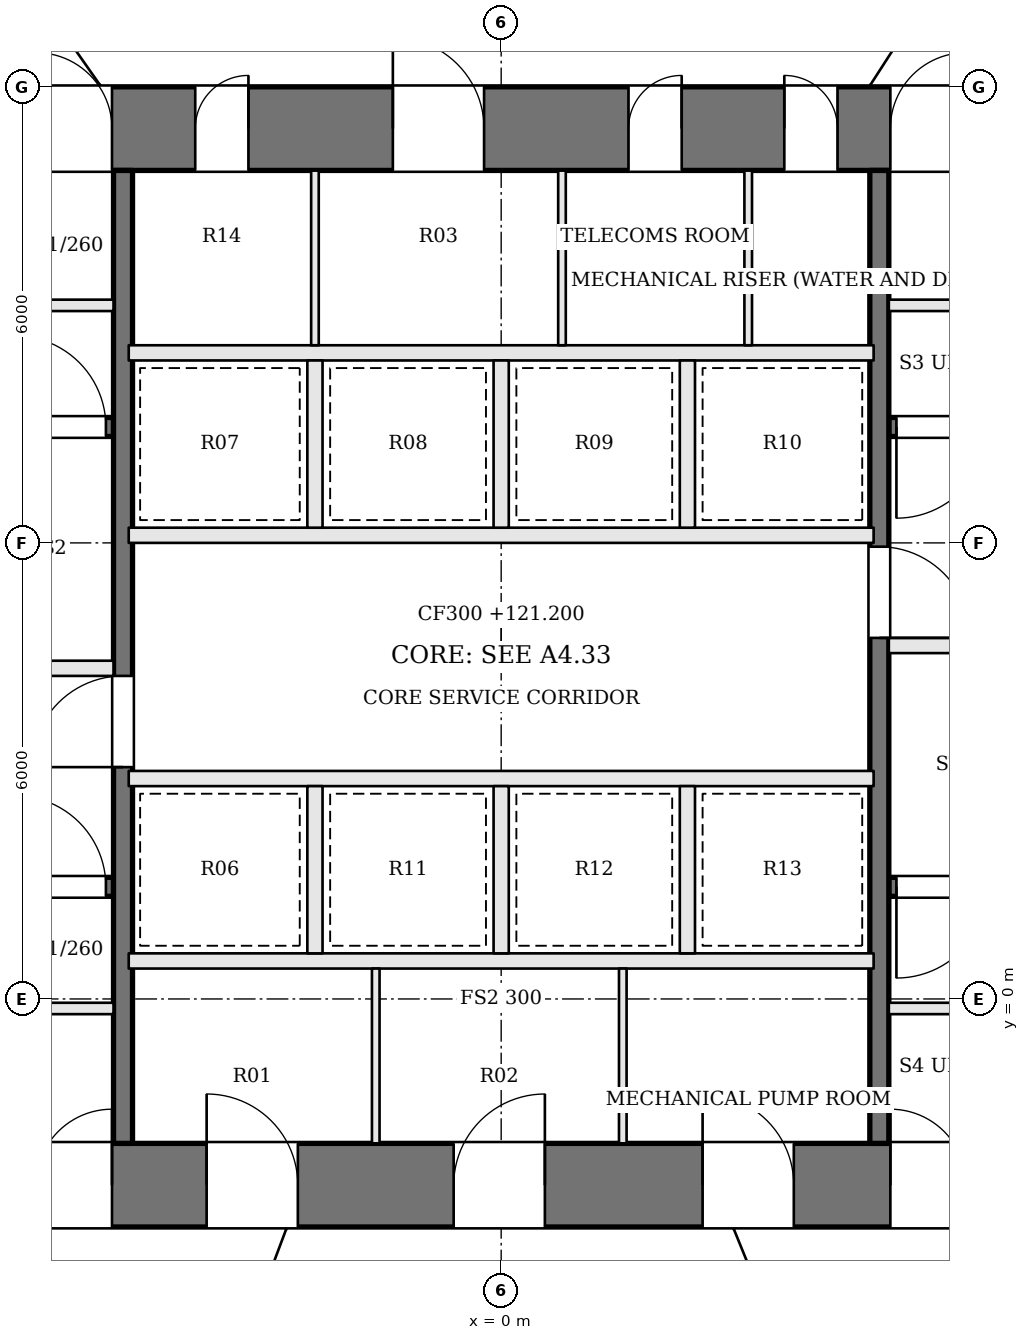
"""IFC4 building model, lengths in metres.
Left out: names, types, materials, properties, quantities, classifications, styles, units other than length and angle.
Written with IfcOpenShell. Run it as: python <this file> out.ifc"""

import sys

from ifc_helpers import new_model, si_unit, direction, frame, frame_2d, origin, place, context, subcontext, project, spatial, rectangle, extrude, element, fill, save


model = new_model("IFC4")
c1 = context("Model", 3, precision=1e-05, world=origin(), true_north=direction((0.0, 1.0)))
c2 = subcontext(c1, "Body", "Model", "MODEL_VIEW")
j1 = project(units=[si_unit("LENGTHUNIT", "METRE"), si_unit("PLANEANGLEUNIT", "RADIAN")], contexts=[c1])
p1 = place(None, origin())
s1 = spatial("IfcSite", under=j1, at=p1, CompositionType="ELEMENT")
p2 = place(p1, origin())
s2 = spatial("IfcBuilding", under=s1, at=p2, CompositionType="ELEMENT")
p3 = place(p2, frame((0.0, 0.0, 121.2)))
s3 = spatial("IfcBuildingStorey", under=s2, at=p3, CompositionType="ELEMENT", Elevation=121.2)
p4 = place(p3, frame((-13.0, 11.45, 0.0), z_axis=(0.0, 0.0, 1.0), x_axis=(1.0, 0.0, 0.0)))
e1 = element("IfcWall", 1, at=p4, inside=s3, PredefinedType="SHEAR", context=c2, shape_type="SweptSolid", body=[
    extrude(rectangle(XDim=26.0, YDim=1.1, at=frame_2d((13.0, 0.0))), origin(), (0.0, 0.0, 1.0), 4.5),
])
p5 = place(p4, frame((8.975, 0.0, 0.0)))
e2 = element("IfcOpeningElement", 2, at=p5, cuts=e1, PredefinedType="OPENING", context=c2, shape_type="SweptSolid", body=[
    extrude(rectangle(XDim=0.7, YDim=2.1, at=frame_2d((0.35, 1.05))), frame((0.0, 0.56, 0.0), z_axis=(0.0, -1.0, 0.0), x_axis=(1.0, 0.0, 0.0)), (0.0, 0.0, 1.0), 1.12),
])
p6 = place(p4, frame((11.575, 0.0, 0.0)))
e3 = element("IfcOpeningElement", 3, at=p6, cuts=e1, PredefinedType="OPENING", context=c2, shape_type="SweptSolid", body=[
    extrude(rectangle(XDim=1.2, YDim=2.1, at=frame_2d((0.6, 1.05))), frame((0.0, 0.56, 0.0), z_axis=(0.0, -1.0, 0.0), x_axis=(1.0, 0.0, 0.0)), (0.0, 0.0, 1.0), 1.12),
])
p7 = place(p4, frame((14.675, 0.0, 0.0)))
e4 = element("IfcOpeningElement", 4, at=p7, cuts=e1, PredefinedType="OPENING", context=c2, shape_type="SweptSolid", body=[
    extrude(rectangle(XDim=0.7, YDim=2.1, at=frame_2d((0.35, 1.05))), frame((0.0, 0.56, 0.0), z_axis=(0.0, -1.0, 0.0), x_axis=(1.0, 0.0, 0.0)), (0.0, 0.0, 1.0), 1.12),
])
p8 = place(p4, frame((16.725, 0.0, 0.0)))
e5 = element("IfcOpeningElement", 5, at=p8, cuts=e1, PredefinedType="OPENING", context=c2, shape_type="SweptSolid", body=[
    extrude(rectangle(XDim=0.7, YDim=2.1, at=frame_2d((0.35, 1.05))), frame((0.0, 0.56, 0.0), z_axis=(0.0, -1.0, 0.0), x_axis=(1.0, 0.0, 0.0)), (0.0, 0.0, 1.0), 1.12),
])
p9 = place(p4, frame((6.88, 0.0, 0.0)))
e6 = element("IfcOpeningElement", 6, at=p9, cuts=e1, PredefinedType="OPENING", context=c2, shape_type="SweptSolid", body=[
    extrude(rectangle(XDim=1.0, YDim=2.1, at=frame_2d((0.5, 1.05))), frame((0.0, 0.56, 0.0), z_axis=(0.0, -1.0, 0.0), x_axis=(1.0, 0.0, 0.0)), (0.0, 0.0, 1.0), 1.12),
])
p10 = place(p4, frame((18.12, 0.0, 0.0)))
e7 = element("IfcOpeningElement", 7, at=p10, cuts=e1, PredefinedType="OPENING", context=c2, shape_type="SweptSolid", body=[
    extrude(rectangle(XDim=1.0, YDim=2.1, at=frame_2d((0.5, 1.05))), frame((0.0, 0.56, 0.0), z_axis=(0.0, -1.0, 0.0), x_axis=(1.0, 0.0, 0.0)), (0.0, 0.0, 1.0), 1.12),
])
p11 = place(p3, frame((-13.0, -2.45, 0.0), z_axis=(0.0, 0.0, 1.0), x_axis=(1.0, 0.0, 0.0)))
e8 = element("IfcWall", 8, at=p11, inside=s3, PredefinedType="SHEAR", context=c2, shape_type="SweptSolid", body=[
    extrude(rectangle(XDim=26.0, YDim=1.1, at=frame_2d((13.0, 0.0))), origin(), (0.0, 0.0, 1.0), 4.5),
])
p12 = place(p11, frame((9.125, 0.0, 0.0)))
e9 = element("IfcOpeningElement", 9, at=p12, cuts=e8, PredefinedType="OPENING", context=c2, shape_type="SweptSolid", body=[
    extrude(rectangle(XDim=1.2, YDim=2.1, at=frame_2d((0.6, 1.05))), frame((0.0, 0.56, 0.0), z_axis=(0.0, -1.0, 0.0), x_axis=(1.0, 0.0, 0.0)), (0.0, 0.0, 1.0), 1.12),
])
p13 = place(p11, frame((12.375, 0.0, 0.0)))
e10 = element("IfcOpeningElement", 10, at=p13, cuts=e8, PredefinedType="OPENING", context=c2, shape_type="SweptSolid", body=[
    extrude(rectangle(XDim=1.2, YDim=2.1, at=frame_2d((0.6, 1.05))), frame((0.0, 0.56, 0.0), z_axis=(0.0, -1.0, 0.0), x_axis=(1.0, 0.0, 0.0)), (0.0, 0.0, 1.0), 1.12),
])
p14 = place(p11, frame((15.65, 0.0, 0.0)))
e11 = element("IfcOpeningElement", 11, at=p14, cuts=e8, PredefinedType="OPENING", context=c2, shape_type="SweptSolid", body=[
    extrude(rectangle(XDim=1.2, YDim=2.1, at=frame_2d((0.6, 1.05))), frame((0.0, 0.56, 0.0), z_axis=(0.0, -1.0, 0.0), x_axis=(1.0, 0.0, 0.0)), (0.0, 0.0, 1.0), 1.12),
])
p15 = place(p11, frame((6.88, 0.0, 0.0)))
e12 = element("IfcOpeningElement", 12, at=p15, cuts=e8, PredefinedType="OPENING", context=c2, shape_type="SweptSolid", body=[
    extrude(rectangle(XDim=1.0, YDim=2.1, at=frame_2d((0.5, 1.05))), frame((0.0, 0.56, 0.0), z_axis=(0.0, -1.0, 0.0), x_axis=(1.0, 0.0, 0.0)), (0.0, 0.0, 1.0), 1.12),
])
p16 = place(p11, frame((18.12, 0.0, 0.0)))
e13 = element("IfcOpeningElement", 13, at=p16, cuts=e8, PredefinedType="OPENING", context=c2, shape_type="SweptSolid", body=[
    extrude(rectangle(XDim=1.0, YDim=2.1, at=frame_2d((0.5, 1.05))), frame((0.0, 0.56, 0.0), z_axis=(0.0, -1.0, 0.0), x_axis=(1.0, 0.0, 0.0)), (0.0, 0.0, 1.0), 1.12),
])
for number, where, z_axis, x_axis in (
    (14, (-6.4, -0.125, 0.0), (0.0, 0.0, 1.0), (1.0, 0.0, 0.0)),
    (15, (6.4, 9.125, 0.0), (0.0, 0.0, 1.0), (-1.0, 0.0, 0.0)),
    (16, (-6.4, 9.125, 0.0), (0.0, 0.0, 1.0), (1.0, 0.0, 0.0)),
    (17, (6.4, -0.125, 0.0), (0.0, 0.0, 1.0), (-1.0, 0.0, 0.0)),
):
    element("IfcWall", number, at=place(p3, frame(where, z_axis=z_axis, x_axis=x_axis)), inside=s3, PredefinedType="SOLIDWALL", context=c2, shape_type="SweptSolid", body=[
        extrude(rectangle(XDim=1.3, YDim=0.15, at=frame_2d((0.65, 0.0))), origin(), (0.0, 0.0, 1.0), 4.3),
    ])
p17 = place(p3, frame((-11.9, 1.475, 0.0), z_axis=(0.0, 0.0, 1.0), x_axis=(1.0, 0.0, 0.0)))
e18 = element("IfcWall", 18, at=p17, inside=s3, PredefinedType="SOLIDWALL", context=c2, shape_type="SweptSolid", body=[
    extrude(rectangle(XDim=6.8, YDim=0.25, at=frame_2d((3.4, 0.0))), origin(), (0.0, 0.0, 1.0), 4.3),
])
p18 = place(p17, frame((5.5, 0.0, 0.0)))
e19 = element("IfcOpeningElement", 19, at=p18, cuts=e18, PredefinedType="OPENING", context=c2, shape_type="SweptSolid", body=[
    extrude(rectangle(XDim=1.2, YDim=2.1, at=frame_2d((0.6, 1.05))), frame((0.0, 0.135, 0.0), z_axis=(0.0, -1.0, 0.0), x_axis=(1.0, 0.0, 0.0)), (0.0, 0.0, 1.0), 0.27),
])
p19 = place(p3, frame((11.9, 7.525, 0.0), z_axis=(0.0, 0.0, 1.0), x_axis=(-1.0, 0.0, 0.0)))
e20 = element("IfcWall", 20, at=p19, inside=s3, PredefinedType="SOLIDWALL", context=c2, shape_type="SweptSolid", body=[
    extrude(rectangle(XDim=6.8, YDim=0.25, at=frame_2d((3.4, 0.0))), origin(), (0.0, 0.0, 1.0), 4.3),
])
p20 = place(p19, frame((5.5, 0.0, 0.0)))
e21 = element("IfcOpeningElement", 21, at=p20, cuts=e20, PredefinedType="OPENING", context=c2, shape_type="SweptSolid", body=[
    extrude(rectangle(XDim=1.2, YDim=2.1, at=frame_2d((0.6, 1.05))), frame((0.0, 0.135, 0.0), z_axis=(0.0, -1.0, 0.0), x_axis=(1.0, 0.0, 0.0)), (0.0, 0.0, 1.0), 0.27),
])
p21 = place(p3, frame((-11.9, 4.35, 0.0), z_axis=(0.0, 0.0, 1.0), x_axis=(1.0, 0.0, 0.0)))
e22 = element("IfcWall", 22, at=p21, inside=s3, PredefinedType="SOLIDWALL", context=c2, shape_type="SweptSolid", body=[
    extrude(rectangle(XDim=6.8, YDim=0.2, at=frame_2d((3.4, 0.0))), origin(), (0.0, 0.0, 1.0), 4.3),
])
p22 = place(p21, frame((4.1, 0.0, 0.0)))
e23 = element("IfcOpeningElement", 23, at=p22, cuts=e22, PredefinedType="OPENING", context=c2, shape_type="SweptSolid", body=[
    extrude(rectangle(XDim=1.2, YDim=2.1, at=frame_2d((0.6, 1.05))), frame((0.0, 0.11, 0.0), z_axis=(0.0, -1.0, 0.0), x_axis=(1.0, 0.0, 0.0)), (0.0, 0.0, 1.0), 0.22),
])
p23 = place(p21, frame((0.8, 0.0, 0.0)))
e24 = element("IfcOpeningElement", 24, at=p23, cuts=e22, PredefinedType="OPENING", context=c2, shape_type="SweptSolid", body=[
    extrude(rectangle(XDim=1.2, YDim=2.1, at=frame_2d((0.6, 1.05))), frame((0.0, 0.11, 0.0), z_axis=(0.0, -1.0, 0.0), x_axis=(1.0, 0.0, 0.0)), (0.0, 0.0, 1.0), 0.22),
])
p24 = place(p3, frame((11.9, 4.65, 0.0), z_axis=(0.0, 0.0, 1.0), x_axis=(-1.0, 0.0, 0.0)))
e25 = element("IfcWall", 25, at=p24, inside=s3, PredefinedType="SOLIDWALL", context=c2, shape_type="SweptSolid", body=[
    extrude(rectangle(XDim=6.8, YDim=0.2, at=frame_2d((3.4, 0.0))), origin(), (0.0, 0.0, 1.0), 4.3),
])
p25 = place(p24, frame((4.1, 0.0, 0.0)))
e26 = element("IfcOpeningElement", 26, at=p25, cuts=e25, PredefinedType="OPENING", context=c2, shape_type="SweptSolid", body=[
    extrude(rectangle(XDim=1.2, YDim=2.1, at=frame_2d((0.6, 1.05))), frame((0.0, 0.11, 0.0), z_axis=(0.0, -1.0, 0.0), x_axis=(1.0, 0.0, 0.0)), (0.0, 0.0, 1.0), 0.22),
])
p26 = place(p24, frame((0.8, 0.0, 0.0)))
e27 = element("IfcOpeningElement", 27, at=p26, cuts=e25, PredefinedType="OPENING", context=c2, shape_type="SweptSolid", body=[
    extrude(rectangle(XDim=1.2, YDim=2.1, at=frame_2d((0.6, 1.05))), frame((0.0, 0.11, 0.0), z_axis=(0.0, -1.0, 0.0), x_axis=(1.0, 0.0, 0.0)), (0.0, 0.0, 1.0), 0.22),
])
p27 = place(p3, frame((-11.9, 7.525, 0.0), z_axis=(0.0, 0.0, 1.0), x_axis=(1.0, 0.0, 0.0)))
e28 = element("IfcWall", 28, at=p27, inside=s3, PredefinedType="SOLIDWALL", context=c2, shape_type="SweptSolid", body=[
    extrude(rectangle(XDim=6.8, YDim=0.25, at=frame_2d((3.4, 0.0))), origin(), (0.0, 0.0, 1.0), 4.3),
])
p28 = place(p27, frame((5.5, 0.0, 0.0)))
e29 = element("IfcOpeningElement", 29, at=p28, cuts=e28, PredefinedType="OPENING", context=c2, shape_type="SweptSolid", body=[
    extrude(rectangle(XDim=1.2, YDim=2.1, at=frame_2d((0.6, 1.05))), frame((0.0, 0.135, 0.0), z_axis=(0.0, -1.0, 0.0), x_axis=(1.0, 0.0, 0.0)), (0.0, 0.0, 1.0), 0.27),
])
p29 = place(p3, frame((11.9, 1.475, 0.0), z_axis=(0.0, 0.0, 1.0), x_axis=(-1.0, 0.0, 0.0)))
e30 = element("IfcWall", 30, at=p29, inside=s3, PredefinedType="SOLIDWALL", context=c2, shape_type="SweptSolid", body=[
    extrude(rectangle(XDim=6.8, YDim=0.25, at=frame_2d((3.4, 0.0))), origin(), (0.0, 0.0, 1.0), 4.3),
])
p30 = place(p29, frame((5.5, 0.0, 0.0)))
e31 = element("IfcOpeningElement", 31, at=p30, cuts=e30, PredefinedType="OPENING", context=c2, shape_type="SweptSolid", body=[
    extrude(rectangle(XDim=1.2, YDim=2.1, at=frame_2d((0.6, 1.05))), frame((0.0, 0.135, 0.0), z_axis=(0.0, -1.0, 0.0), x_axis=(1.0, 0.0, 0.0)), (0.0, 0.0, 1.0), 0.27),
])
p31 = place(p3, frame((-4.975, -1.9, 0.0), z_axis=(0.0, 0.0, 1.0), x_axis=(0.0, 1.0, 0.0)))
e32 = element("IfcWall", 32, at=p31, inside=s3, PredefinedType="SOLIDWALL", context=c2, shape_type="SweptSolid", body=[
    extrude(rectangle(XDim=12.8, YDim=0.25, at=frame_2d((6.4, 0.0))), origin(), (0.0, 0.0, 1.0), 4.3),
])
p32 = place(p31, frame((4.95, 0.0, 0.0)))
e33 = element("IfcOpeningElement", 33, at=p32, cuts=e32, PredefinedType="OPENING", context=c2, shape_type="SweptSolid", body=[
    extrude(rectangle(XDim=1.2, YDim=2.1, at=frame_2d((0.6, 1.05))), frame((0.0, 0.135, 0.0), z_axis=(0.0, -1.0, 0.0), x_axis=(1.0, 0.0, 0.0)), (0.0, 0.0, 1.0), 0.27),
])
p33 = place(p3, frame((4.975, 10.9, 0.0), z_axis=(0.0, 0.0, 1.0), x_axis=(0.0, -1.0, 0.0)))
e34 = element("IfcWall", 34, at=p33, inside=s3, PredefinedType="SOLIDWALL", context=c2, shape_type="SweptSolid", body=[
    extrude(rectangle(XDim=12.8, YDim=0.25, at=frame_2d((6.4, 0.0))), origin(), (0.0, 0.0, 1.0), 4.3),
])
p34 = place(p33, frame((4.95, 0.0, 0.0)))
e35 = element("IfcOpeningElement", 35, at=p34, cuts=e34, PredefinedType="OPENING", context=c2, shape_type="SweptSolid", body=[
    extrude(rectangle(XDim=1.2, YDim=2.1, at=frame_2d((0.6, 1.05))), frame((0.0, 0.135, 0.0), z_axis=(0.0, -1.0, 0.0), x_axis=(1.0, 0.0, 0.0)), (0.0, 0.0, 1.0), 0.27),
])
for number, where, z_axis, x_axis in (
    (36, (-4.9, 0.5, 0.0), (0.0, 0.0, 1.0), (1.0, 0.0, 0.0)),
    (37, (-4.9, 2.9, 0.0), (0.0, 0.0, 1.0), (1.0, 0.0, 0.0)),
    (38, (-4.9, 6.1, 0.0), (0.0, 0.0, 1.0), (1.0, 0.0, 0.0)),
    (39, (-4.9, 8.5, 0.0), (0.0, 0.0, 1.0), (1.0, 0.0, 0.0)),
):
    element("IfcWall", number, at=place(p3, frame(where, z_axis=z_axis, x_axis=x_axis)), inside=s3, PredefinedType="SOLIDWALL", context=c2, shape_type="SweptSolid", body=[
        extrude(rectangle(XDim=9.8, YDim=0.2, at=frame_2d((4.9, 0.0))), origin(), (0.0, 0.0, 1.0), 4.3),
    ])
for number, where, z_axis, x_axis in (
    (40, (-2.45, 0.6, 0.0), (0.0, 0.0, 1.0), (0.0, 1.0, 0.0)),
    (41, (0.0, 0.6, 0.0), (0.0, 0.0, 1.0), (0.0, 1.0, 0.0)),
    (42, (2.45, 0.6, 0.0), (0.0, 0.0, 1.0), (0.0, 1.0, 0.0)),
    (43, (-2.45, 6.2, 0.0), (0.0, 0.0, 1.0), (0.0, 1.0, 0.0)),
    (44, (0.0, 6.2, 0.0), (0.0, 0.0, 1.0), (0.0, 1.0, 0.0)),
    (45, (2.45, 6.2, 0.0), (0.0, 0.0, 1.0), (0.0, 1.0, 0.0)),
):
    element("IfcWall", number, at=place(p3, frame(where, z_axis=z_axis, x_axis=x_axis)), inside=s3, PredefinedType="SOLIDWALL", context=c2, shape_type="SweptSolid", body=[
        extrude(rectangle(XDim=2.2, YDim=0.2, at=frame_2d((1.1, 0.0))), origin(), (0.0, 0.0, 1.0), 4.3),
    ])
for number, where, z_axis, x_axis in (
    (46, (-1.65, -1.9, 0.0), (0.0, 0.0, 1.0), (0.0, 1.0, 0.0)),
    (47, (1.6, -1.9, 0.0), (0.0, 0.0, 1.0), (0.0, 1.0, 0.0)),
    (48, (-2.45, 8.6, 0.0), (0.0, 0.0, 1.0), (0.0, 1.0, 0.0)),
    (49, (0.8, 8.6, 0.0), (0.0, 0.0, 1.0), (0.0, 1.0, 0.0)),
    (50, (3.25, 8.6, 0.0), (0.0, 0.0, 1.0), (0.0, 1.0, 0.0)),
):
    element("IfcWall", number, at=place(p3, frame(where, z_axis=z_axis, x_axis=x_axis)), inside=s3, PredefinedType="PARTITIONING", context=c2, shape_type="SweptSolid", body=[
        extrude(rectangle(XDim=2.3, YDim=0.1, at=frame_2d((1.15, 0.0))), origin(), (0.0, 0.0, 1.0), 4.3),
    ])
p35 = place(p32, origin())
e51 = element("IfcDoor", 51, at=p35, inside=s3, OperationType="SINGLE_SWING_LEFT", PredefinedType="DOOR", context=c2, shape_type="SweptSolid", body=[
    extrude(rectangle(XDim=1.2, YDim=2.1, at=frame_2d((0.6, 1.05))), frame((0.0, 0.025, 0.0), z_axis=(0.0, -1.0, 0.0), x_axis=(1.0, 0.0, 0.0)), (0.0, 0.0, 1.0), 0.05),
])
fill(e33, e51)
p36 = place(p34, origin())
e52 = element("IfcDoor", 52, at=p36, inside=s3, OperationType="SINGLE_SWING_RIGHT", PredefinedType="DOOR", context=c2, shape_type="SweptSolid", body=[
    extrude(rectangle(XDim=1.2, YDim=2.1, at=frame_2d((0.6, 1.05))), frame((0.0, 0.025, 0.0), z_axis=(0.0, -1.0, 0.0), x_axis=(1.0, 0.0, 0.0)), (0.0, 0.0, 1.0), 0.05),
])
fill(e35, e52)
p37 = place(p18, origin())
e53 = element("IfcDoor", 53, at=p37, inside=s3, OperationType="SINGLE_SWING_LEFT", PredefinedType="DOOR", context=c2, shape_type="SweptSolid", body=[
    extrude(rectangle(XDim=1.2, YDim=2.1, at=frame_2d((0.6, 1.05))), frame((0.0, 0.025, 0.0), z_axis=(0.0, -1.0, 0.0), x_axis=(1.0, 0.0, 0.0)), (0.0, 0.0, 1.0), 0.05),
])
fill(e19, e53)
p38 = place(p20, origin())
e54 = element("IfcDoor", 54, at=p38, inside=s3, OperationType="SINGLE_SWING_RIGHT", PredefinedType="DOOR", context=c2, shape_type="SweptSolid", body=[
    extrude(rectangle(XDim=1.2, YDim=2.1, at=frame_2d((0.6, 1.05))), frame((0.0, 0.025, 0.0), z_axis=(0.0, -1.0, 0.0), x_axis=(1.0, 0.0, 0.0)), (0.0, 0.0, 1.0), 0.05),
])
fill(e21, e54)
p39 = place(p28, origin())
e55 = element("IfcDoor", 55, at=p39, inside=s3, OperationType="SINGLE_SWING_LEFT", PredefinedType="DOOR", context=c2, shape_type="SweptSolid", body=[
    extrude(rectangle(XDim=1.2, YDim=2.1, at=frame_2d((0.6, 1.05))), frame((0.0, 0.025, 0.0), z_axis=(0.0, -1.0, 0.0), x_axis=(1.0, 0.0, 0.0)), (0.0, 0.0, 1.0), 0.05),
])
fill(e29, e55)
p40 = place(p30, origin())
e56 = element("IfcDoor", 56, at=p40, inside=s3, OperationType="SINGLE_SWING_RIGHT", PredefinedType="DOOR", context=c2, shape_type="SweptSolid", body=[
    extrude(rectangle(XDim=1.2, YDim=2.1, at=frame_2d((0.6, 1.05))), frame((0.0, 0.025, 0.0), z_axis=(0.0, -1.0, 0.0), x_axis=(1.0, 0.0, 0.0)), (0.0, 0.0, 1.0), 0.05),
])
fill(e31, e56)
p41 = place(p12, origin())
e57 = element("IfcDoor", 57, at=p41, inside=s3, OperationType="SINGLE_SWING_LEFT", PredefinedType="DOOR", context=c2, shape_type="SweptSolid", body=[
    extrude(rectangle(XDim=1.2, YDim=2.1, at=frame_2d((0.6, 1.05))), frame((0.0, 0.025, 0.0), z_axis=(0.0, -1.0, 0.0), x_axis=(1.0, 0.0, 0.0)), (0.0, 0.0, 1.0), 0.05),
])
fill(e9, e57)
p42 = place(p13, origin())
e58 = element("IfcDoor", 58, at=p42, inside=s3, OperationType="SINGLE_SWING_RIGHT", PredefinedType="DOOR", context=c2, shape_type="SweptSolid", body=[
    extrude(rectangle(XDim=1.2, YDim=2.1, at=frame_2d((0.6, 1.05))), frame((0.0, 0.025, 0.0), z_axis=(0.0, -1.0, 0.0), x_axis=(1.0, 0.0, 0.0)), (0.0, 0.0, 1.0), 0.05),
])
fill(e10, e58)
p43 = place(p14, origin())
e59 = element("IfcDoor", 59, at=p43, inside=s3, OperationType="SINGLE_SWING_LEFT", PredefinedType="DOOR", context=c2, shape_type="SweptSolid", body=[
    extrude(rectangle(XDim=1.2, YDim=2.1, at=frame_2d((0.6, 1.05))), frame((0.0, 0.025, 0.0), z_axis=(0.0, -1.0, 0.0), x_axis=(1.0, 0.0, 0.0)), (0.0, 0.0, 1.0), 0.05),
])
fill(e11, e59)
p44 = place(p5, origin())
e60 = element("IfcDoor", 60, at=p44, inside=s3, OperationType="SINGLE_SWING_RIGHT", PredefinedType="DOOR", context=c2, shape_type="SweptSolid", body=[
    extrude(rectangle(XDim=0.7, YDim=2.1, at=frame_2d((0.35, 1.05))), frame((0.0, 0.025, 0.0), z_axis=(0.0, -1.0, 0.0), x_axis=(1.0, 0.0, 0.0)), (0.0, 0.0, 1.0), 0.05),
])
fill(e2, e60)
p45 = place(p6, origin())
e61 = element("IfcDoor", 61, at=p45, inside=s3, OperationType="SINGLE_SWING_LEFT", PredefinedType="DOOR", context=c2, shape_type="SweptSolid", body=[
    extrude(rectangle(XDim=1.2, YDim=2.1, at=frame_2d((0.6, 1.05))), frame((0.0, 0.025, 0.0), z_axis=(0.0, -1.0, 0.0), x_axis=(1.0, 0.0, 0.0)), (0.0, 0.0, 1.0), 0.05),
])
fill(e3, e61)
p46 = place(p7, origin())
e62 = element("IfcDoor", 62, at=p46, inside=s3, OperationType="SINGLE_SWING_RIGHT", PredefinedType="DOOR", context=c2, shape_type="SweptSolid", body=[
    extrude(rectangle(XDim=0.7, YDim=2.1, at=frame_2d((0.35, 1.05))), frame((0.0, 0.025, 0.0), z_axis=(0.0, -1.0, 0.0), x_axis=(1.0, 0.0, 0.0)), (0.0, 0.0, 1.0), 0.05),
])
fill(e4, e62)
p47 = place(p8, origin())
e63 = element("IfcDoor", 63, at=p47, inside=s3, OperationType="SINGLE_SWING_LEFT", PredefinedType="DOOR", context=c2, shape_type="SweptSolid", body=[
    extrude(rectangle(XDim=0.7, YDim=2.1, at=frame_2d((0.35, 1.05))), frame((0.0, 0.025, 0.0), z_axis=(0.0, -1.0, 0.0), x_axis=(1.0, 0.0, 0.0)), (0.0, 0.0, 1.0), 0.05),
])
fill(e5, e63)
p48 = place(p15, origin())
e64 = element("IfcDoor", 64, at=p48, inside=s3, OperationType="SINGLE_SWING_RIGHT", PredefinedType="DOOR", context=c2, shape_type="SweptSolid", body=[
    extrude(rectangle(XDim=1.0, YDim=2.1, at=frame_2d((0.5, 1.05))), frame((0.0, 0.025, 0.0), z_axis=(0.0, -1.0, 0.0), x_axis=(1.0, 0.0, 0.0)), (0.0, 0.0, 1.0), 0.05),
])
fill(e12, e64)
p49 = place(p9, origin())
e65 = element("IfcDoor", 65, at=p49, inside=s3, OperationType="SINGLE_SWING_LEFT", PredefinedType="DOOR", context=c2, shape_type="SweptSolid", body=[
    extrude(rectangle(XDim=1.0, YDim=2.1, at=frame_2d((0.5, 1.05))), frame((0.0, 0.025, 0.0), z_axis=(0.0, -1.0, 0.0), x_axis=(1.0, 0.0, 0.0)), (0.0, 0.0, 1.0), 0.05),
])
fill(e6, e65)
p50 = place(p10, origin())
e66 = element("IfcDoor", 66, at=p50, inside=s3, OperationType="SINGLE_SWING_RIGHT", PredefinedType="DOOR", context=c2, shape_type="SweptSolid", body=[
    extrude(rectangle(XDim=1.0, YDim=2.1, at=frame_2d((0.5, 1.05))), frame((0.0, 0.025, 0.0), z_axis=(0.0, -1.0, 0.0), x_axis=(1.0, 0.0, 0.0)), (0.0, 0.0, 1.0), 0.05),
])
fill(e7, e66)
p51 = place(p16, origin())
e67 = element("IfcDoor", 67, at=p51, inside=s3, OperationType="SINGLE_SWING_LEFT", PredefinedType="DOOR", context=c2, shape_type="SweptSolid", body=[
    extrude(rectangle(XDim=1.0, YDim=2.1, at=frame_2d((0.5, 1.05))), frame((0.0, 0.025, 0.0), z_axis=(0.0, -1.0, 0.0), x_axis=(1.0, 0.0, 0.0)), (0.0, 0.0, 1.0), 0.05),
])
fill(e13, e67)
save(model, sys.argv[1])
